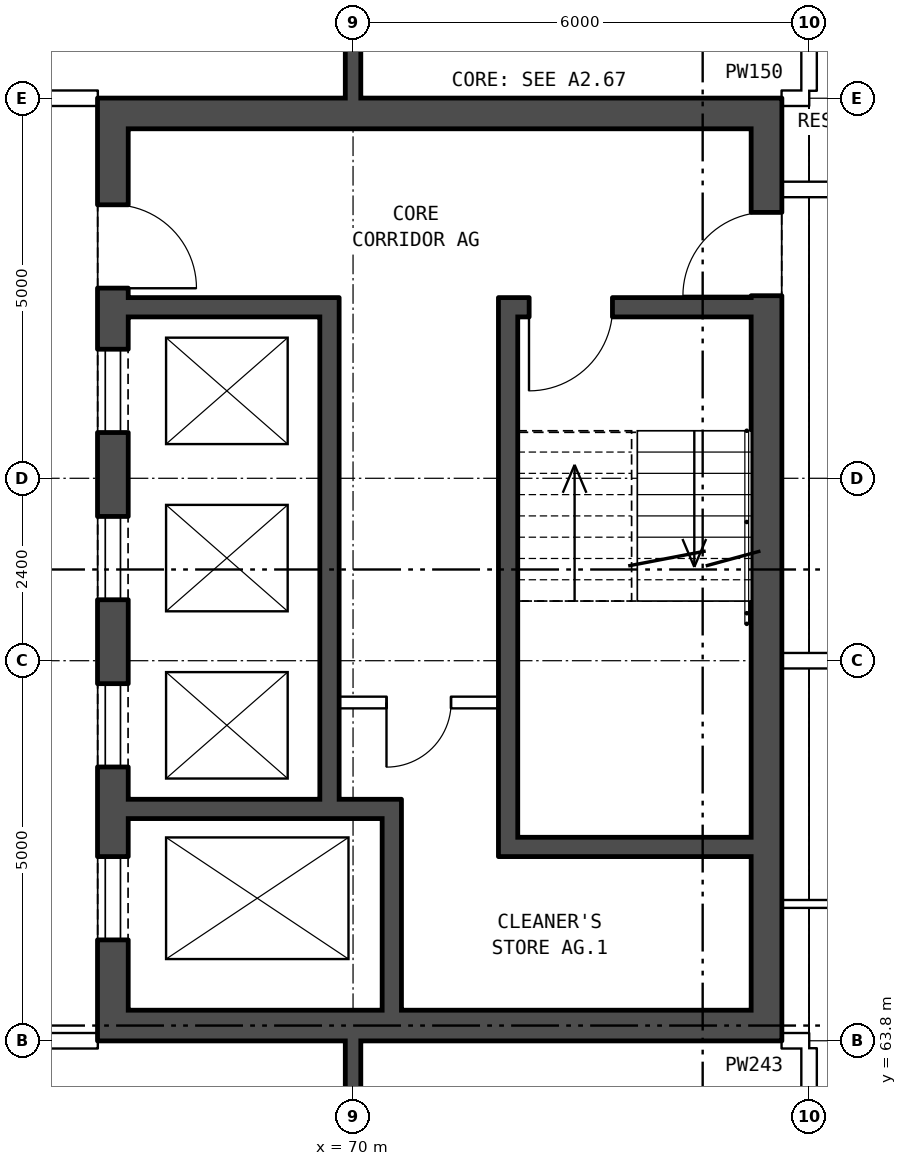
"""IFC4 building model, lengths in metres.
Left out: names, types, materials, properties, quantities, classifications, styles, units other than length and angle.
Written with IfcOpenShell. Run it as: python <this file> out.ifc"""

import sys

from ifc_helpers import new_model, si_unit, direction, frame, frame_2d, origin, place, context, subcontext, project, spatial, rectangle, extrude, element, fill, save


model = new_model("IFC4")
c1 = context("Model", 3, precision=1e-05, world=origin(), true_north=direction((0.0, 1.0)))
c2 = subcontext(c1, "Body", "Model", "MODEL_VIEW")
j1 = project(units=[si_unit("LENGTHUNIT", "METRE"), si_unit("PLANEANGLEUNIT", "RADIAN")], contexts=[c1])
p1 = place(None, origin())
s1 = spatial("IfcSite", under=j1, at=p1, CompositionType="ELEMENT")
p2 = place(p1, origin())
s2 = spatial("IfcBuilding", under=s1, at=p2, CompositionType="ELEMENT")
p3 = place(p2, frame((0.0, 0.0, 233.8)))
s3 = spatial("IfcBuildingStorey", under=s2, at=p3, CompositionType="ELEMENT", Elevation=233.8)
p4 = place(p3, frame((66.84, 63.8, 0.0), z_axis=(0.0, 0.0, 1.0), x_axis=(0.0, 1.0, 0.0)))
e1 = element("IfcWall", 1, at=p4, inside=s3, PredefinedType="SHEAR", context=c2, shape_type="SweptSolid", body=[
    extrude(rectangle(XDim=12.4, YDim=0.4, at=frame_2d((6.2, 0.0))), origin(), (0.0, 0.0, 1.0), 2.85),
])
p5 = place(p4, frame((1.325, 0.0, 0.0)))
e2 = element("IfcOpeningElement", 2, at=p5, cuts=e1, PredefinedType="OPENING", context=c2, shape_type="SweptSolid", body=[
    extrude(rectangle(XDim=1.1, YDim=2.1, at=frame_2d((0.55, 1.05))), frame((0.0, 0.21, 0.0), z_axis=(0.0, -1.0, 0.0), x_axis=(1.0, 0.0, 0.0)), (0.0, 0.0, 1.0), 0.42),
])
p6 = place(p4, frame((3.6, 0.0, 0.0)))
e3 = element("IfcOpeningElement", 3, at=p6, cuts=e1, PredefinedType="OPENING", context=c2, shape_type="SweptSolid", body=[
    extrude(rectangle(XDim=1.1, YDim=2.1, at=frame_2d((0.55, 1.05))), frame((0.0, 0.21, 0.0), z_axis=(0.0, -1.0, 0.0), x_axis=(1.0, 0.0, 0.0)), (0.0, 0.0, 1.0), 0.42),
])
p7 = place(p4, frame((5.8, 0.0, 0.0)))
e4 = element("IfcOpeningElement", 4, at=p7, cuts=e1, PredefinedType="OPENING", context=c2, shape_type="SweptSolid", body=[
    extrude(rectangle(XDim=1.1, YDim=2.1, at=frame_2d((0.55, 1.05))), frame((0.0, 0.21, 0.0), z_axis=(0.0, -1.0, 0.0), x_axis=(1.0, 0.0, 0.0)), (0.0, 0.0, 1.0), 0.42),
])
p8 = place(p4, frame((8.0, 0.0, 0.0)))
e5 = element("IfcOpeningElement", 5, at=p8, cuts=e1, PredefinedType="OPENING", context=c2, shape_type="SweptSolid", body=[
    extrude(rectangle(XDim=1.1, YDim=2.1, at=frame_2d((0.55, 1.05))), frame((0.0, 0.21, 0.0), z_axis=(0.0, -1.0, 0.0), x_axis=(1.0, 0.0, 0.0)), (0.0, 0.0, 1.0), 0.42),
])
p9 = place(p4, frame((9.9, 0.0, 0.0)))
e6 = element("IfcOpeningElement", 6, at=p9, cuts=e1, PredefinedType="OPENING", context=c2, shape_type="SweptSolid", body=[
    extrude(rectangle(XDim=1.1, YDim=2.1, at=frame_2d((0.55, 1.05))), frame((0.0, 0.21, 0.0), z_axis=(0.0, -1.0, 0.0), x_axis=(1.0, 0.0, 0.0)), (0.0, 0.0, 1.0), 0.42),
])
p10 = place(p3, frame((75.44, 63.8, 0.0), z_axis=(0.0, 0.0, 1.0), x_axis=(0.0, 1.0, 0.0)))
e7 = element("IfcWall", 7, at=p10, inside=s3, PredefinedType="SHEAR", context=c2, shape_type="SweptSolid", body=[
    extrude(rectangle(XDim=12.4, YDim=0.4, at=frame_2d((6.2, 0.0))), origin(), (0.0, 0.0, 1.0), 2.85),
])
p11 = place(p10, frame((9.8, 0.0, 0.0)))
e8 = element("IfcOpeningElement", 8, at=p11, cuts=e7, PredefinedType="OPENING", context=c2, shape_type="SweptSolid", body=[
    extrude(rectangle(XDim=1.1, YDim=2.1, at=frame_2d((0.55, 1.05))), frame((0.0, 0.21, 0.0), z_axis=(0.0, -1.0, 0.0), x_axis=(1.0, 0.0, 0.0)), (0.0, 0.0, 1.0), 0.42),
])
for number, where, z_axis, x_axis in (
    (9, (67.04, 64.0, 0.0), (0.0, 0.0, 1.0), (1.0, 0.0, 0.0)),
    (10, (67.04, 76.0, 0.0), (0.0, 0.0, 1.0), (1.0, 0.0, 0.0)),
):
    element("IfcWall", number, at=place(p3, frame(where, z_axis=z_axis, x_axis=x_axis)), inside=s3, PredefinedType="SHEAR", context=c2, shape_type="SweptSolid", body=[
        extrude(rectangle(XDim=8.2, YDim=0.4, at=frame_2d((4.1, 0.0))), origin(), (0.0, 0.0, 1.0), 2.85),
    ])
p12 = place(p3, frame((72.165, 66.35, 0.0), z_axis=(0.0, 0.0, 1.0), x_axis=(1.0, 0.0, 0.0)))
e11 = element("IfcWall", 11, at=p12, inside=s3, PredefinedType="SHEAR", context=c2, shape_type="SweptSolid", body=[
    extrude(rectangle(XDim=3.075, YDim=0.25, at=frame_2d((1.538, 0.0))), origin(), (0.0, 0.0, 1.0), 2.85),
])
p13 = place(p3, frame((67.04, 66.85, 0.0), z_axis=(0.0, 0.0, 1.0), x_axis=(1.0, 0.0, 0.0)))
e12 = element("IfcWall", 12, at=p13, inside=s3, PredefinedType="SHEAR", context=c2, shape_type="SweptSolid", body=[
    extrude(rectangle(XDim=3.595, YDim=0.25, at=frame_2d((1.797, 0.0))), origin(), (0.0, 0.0, 1.0), 2.85),
])
p14 = place(p3, frame((69.815, 68.25, 0.0), z_axis=(0.0, 0.0, 1.0), x_axis=(1.0, 0.0, 0.0)))
e13 = element("IfcWall", 13, at=p14, inside=s3, PredefinedType="PARTITIONING", context=c2, shape_type="SweptSolid", body=[
    extrude(rectangle(XDim=2.1, YDim=0.15, at=frame_2d((1.05, 0.0))), origin(), (0.0, 0.0, 1.0), 2.85),
])
p15 = place(p14, frame((0.625, 0.0, 0.0)))
e14 = element("IfcOpeningElement", 14, at=p15, cuts=e13, PredefinedType="OPENING", context=c2, shape_type="SweptSolid", body=[
    extrude(rectangle(XDim=0.85, YDim=2.1, at=frame_2d((0.425, 1.05))), frame((0.0, 0.085, 0.0), z_axis=(0.0, -1.0, 0.0), x_axis=(1.0, 0.0, 0.0)), (0.0, 0.0, 1.0), 0.17),
])
p16 = place(p3, frame((67.04, 73.45, 0.0), z_axis=(0.0, 0.0, 1.0), x_axis=(1.0, 0.0, 0.0)))
e15 = element("IfcWall", 15, at=p16, inside=s3, PredefinedType="SHEAR", context=c2, shape_type="SweptSolid", body=[
    extrude(rectangle(XDim=2.525, YDim=0.25, at=frame_2d((1.262, 0.0))), origin(), (0.0, 0.0, 1.0), 2.85),
])
p17 = place(p3, frame((72.165, 73.45, 0.0), z_axis=(0.0, 0.0, 1.0), x_axis=(1.0, 0.0, 0.0)))
e16 = element("IfcWall", 16, at=p17, inside=s3, PredefinedType="SHEAR", context=c2, shape_type="SweptSolid", body=[
    extrude(rectangle(XDim=3.075, YDim=0.25, at=frame_2d((1.538, 0.0))), origin(), (0.0, 0.0, 1.0), 2.85),
])
p18 = place(p17, frame((0.15, 0.0, 0.0)))
e17 = element("IfcOpeningElement", 17, at=p18, cuts=e16, PredefinedType="OPENING", context=c2, shape_type="SweptSolid", body=[
    extrude(rectangle(XDim=1.1, YDim=2.1, at=frame_2d((0.55, 1.05))), frame((0.0, 0.135, 0.0), z_axis=(0.0, -1.0, 0.0), x_axis=(1.0, 0.0, 0.0)), (0.0, 0.0, 1.0), 0.27),
])
p19 = place(p3, frame((69.69, 66.975, 0.0), z_axis=(0.0, 0.0, 1.0), x_axis=(0.0, 1.0, 0.0)))
e18 = element("IfcWall", 18, at=p19, inside=s3, PredefinedType="SHEAR", context=c2, shape_type="SweptSolid", body=[
    extrude(rectangle(XDim=6.6, YDim=0.25, at=frame_2d((3.3, 0.0))), origin(), (0.0, 0.0, 1.0), 2.85),
])
p20 = place(p3, frame((70.51, 64.2, 0.0), z_axis=(0.0, 0.0, 1.0), x_axis=(0.0, 1.0, 0.0)))
e19 = element("IfcWall", 19, at=p20, inside=s3, PredefinedType="SHEAR", context=c2, shape_type="SweptSolid", body=[
    extrude(rectangle(XDim=2.525, YDim=0.25, at=frame_2d((1.263, 0.0))), origin(), (0.0, 0.0, 1.0), 2.85),
])
p21 = place(p3, frame((72.04, 66.225, 0.0), z_axis=(0.0, 0.0, 1.0), x_axis=(0.0, 1.0, 0.0)))
e20 = element("IfcWall", 20, at=p21, inside=s3, PredefinedType="SHEAR", context=c2, shape_type="SweptSolid", body=[
    extrude(rectangle(XDim=7.35, YDim=0.25, at=frame_2d((3.675, 0.0))), origin(), (0.0, 0.0, 1.0), 2.85),
])
p22 = place(p3, frame((63.64, 63.8, 0.0), z_axis=(0.0, 0.0, 1.0), x_axis=(1.0, 0.0, 0.0)))
e21 = element("IfcWall", 21, at=p22, inside=s3, PredefinedType="PARTITIONING", context=c2, shape_type="SweptSolid", body=[
    extrude(rectangle(XDim=3.0, YDim=0.2, at=frame_2d((1.5, 0.0))), origin(), (0.0, 0.0, 1.0), 2.85),
])
p23 = place(p22, frame((1.18, 0.0, 0.0)))
e22 = element("IfcOpeningElement", 22, at=p23, cuts=e21, PredefinedType="OPENING", context=c2, shape_type="SweptSolid", body=[
    extrude(rectangle(XDim=1.0, YDim=2.1, at=frame_2d((0.5, 1.05))), frame((0.0, 0.11, 0.0), z_axis=(0.0, -1.0, 0.0), x_axis=(1.0, 0.0, 0.0)), (0.0, 0.0, 1.0), 0.22),
])
p24 = place(p3, frame((75.64, 63.8, 0.0), z_axis=(0.0, 0.0, 1.0), x_axis=(1.0, 0.0, 0.0)))
e23 = element("IfcWall", 23, at=p24, inside=s3, PredefinedType="PARTITIONING", context=c2, shape_type="SweptSolid", body=[
    extrude(rectangle(XDim=0.36, YDim=0.2, at=frame_2d((0.18, 0.0))), origin(), (0.0, 0.0, 1.0), 2.85),
])
p25 = place(p3, frame((75.64, 65.6, 0.0), z_axis=(0.0, 0.0, 1.0), x_axis=(1.0, 0.0, 0.0)))
e24 = element("IfcWall", 24, at=p25, inside=s3, PredefinedType="PARTITIONING", context=c2, shape_type="SweptSolid", body=[
    extrude(rectangle(XDim=3.798, YDim=0.1, at=frame_2d((1.899, 0.0))), origin(), (0.0, 0.0, 1.0), 2.85),
])
p26 = place(p3, frame((75.64, 68.8, 0.0), z_axis=(0.0, 0.0, 1.0), x_axis=(1.0, 0.0, 0.0)))
e25 = element("IfcWall", 25, at=p26, inside=s3, PredefinedType="PARTITIONING", context=c2, shape_type="SweptSolid", body=[
    extrude(rectangle(XDim=55.72, YDim=0.2, at=frame_2d((27.86, 0.0))), origin(), (0.0, 0.0, 1.0), 2.85),
])
p27 = place(p26, frame((5.191, 0.0, 0.0)))
e26 = element("IfcOpeningElement", 26, at=p27, cuts=e25, PredefinedType="OPENING", context=c2, shape_type="SweptSolid", body=[
    extrude(rectangle(XDim=1.0, YDim=2.1, at=frame_2d((0.5, 1.05))), frame((0.0, 0.11, 0.0), z_axis=(0.0, -1.0, 0.0), x_axis=(1.0, 0.0, 0.0)), (0.0, 0.0, 1.0), 0.22),
])
p28 = place(p26, frame((12.241, 0.0, 0.0)))
e27 = element("IfcOpeningElement", 27, at=p28, cuts=e25, PredefinedType="OPENING", context=c2, shape_type="SweptSolid", body=[
    extrude(rectangle(XDim=1.0, YDim=2.1, at=frame_2d((0.5, 1.05))), frame((0.0, 0.11, 0.0), z_axis=(0.0, -1.0, 0.0), x_axis=(1.0, 0.0, 0.0)), (0.0, 0.0, 1.0), 0.22),
])
p29 = place(p26, frame((22.553, 0.0, 0.0)))
e28 = element("IfcOpeningElement", 28, at=p29, cuts=e25, PredefinedType="OPENING", context=c2, shape_type="SweptSolid", body=[
    extrude(rectangle(XDim=1.0, YDim=2.1, at=frame_2d((0.5, 1.05))), frame((0.0, 0.11, 0.0), z_axis=(0.0, -1.0, 0.0), x_axis=(1.0, 0.0, 0.0)), (0.0, 0.0, 1.0), 0.22),
])
p30 = place(p26, frame((32.866, 0.0, 0.0)))
e29 = element("IfcOpeningElement", 29, at=p30, cuts=e25, PredefinedType="OPENING", context=c2, shape_type="SweptSolid", body=[
    extrude(rectangle(XDim=1.0, YDim=2.1, at=frame_2d((0.5, 1.05))), frame((0.0, 0.11, 0.0), z_axis=(0.0, -1.0, 0.0), x_axis=(1.0, 0.0, 0.0)), (0.0, 0.0, 1.0), 0.22),
])
p31 = place(p26, frame((36.303, 0.0, 0.0)))
e30 = element("IfcOpeningElement", 30, at=p31, cuts=e25, PredefinedType="OPENING", context=c2, shape_type="SweptSolid", body=[
    extrude(rectangle(XDim=1.0, YDim=2.1, at=frame_2d((0.5, 1.05))), frame((0.0, 0.11, 0.0), z_axis=(0.0, -1.0, 0.0), x_axis=(1.0, 0.0, 0.0)), (0.0, 0.0, 1.0), 0.22),
])
p32 = place(p26, frame((46.616, 0.0, 0.0)))
e31 = element("IfcOpeningElement", 31, at=p32, cuts=e25, PredefinedType="OPENING", context=c2, shape_type="SweptSolid", body=[
    extrude(rectangle(XDim=1.0, YDim=2.1, at=frame_2d((0.5, 1.05))), frame((0.0, 0.11, 0.0), z_axis=(0.0, -1.0, 0.0), x_axis=(1.0, 0.0, 0.0)), (0.0, 0.0, 1.0), 0.22),
])
p33 = place(p26, frame((53.496, 0.0, 0.0)))
e32 = element("IfcOpeningElement", 32, at=p33, cuts=e25, PredefinedType="OPENING", context=c2, shape_type="SweptSolid", body=[
    extrude(rectangle(XDim=1.0, YDim=2.1, at=frame_2d((0.5, 1.05))), frame((0.0, 0.11, 0.0), z_axis=(0.0, -1.0, 0.0), x_axis=(1.0, 0.0, 0.0)), (0.0, 0.0, 1.0), 0.22),
])
p34 = place(p3, frame((75.64, 75.0, 0.0), z_axis=(0.0, 0.0, 1.0), x_axis=(1.0, 0.0, 0.0)))
e33 = element("IfcWall", 33, at=p34, inside=s3, PredefinedType="PARTITIONING", context=c2, shape_type="SweptSolid", body=[
    extrude(rectangle(XDim=7.585, YDim=0.2, at=frame_2d((3.792, 0.0))), origin(), (0.0, 0.0, 1.0), 2.85),
])
p35 = place(p34, frame((3.343, 0.0, 0.0)))
e34 = element("IfcOpeningElement", 34, at=p35, cuts=e33, PredefinedType="OPENING", context=c2, shape_type="SweptSolid", body=[
    extrude(rectangle(XDim=0.9, YDim=2.1, at=frame_2d((0.45, 1.05))), frame((0.0, 0.11, 0.0), z_axis=(0.0, -1.0, 0.0), x_axis=(1.0, 0.0, 0.0)), (0.0, 0.0, 1.0), 0.22),
])
p36 = place(p3, frame((63.64, 76.2, 0.0), z_axis=(0.0, 0.0, 1.0), x_axis=(1.0, 0.0, 0.0)))
e35 = element("IfcWall", 35, at=p36, inside=s3, PredefinedType="PARTITIONING", context=c2, shape_type="SweptSolid", body=[
    extrude(rectangle(XDim=3.0, YDim=0.2, at=frame_2d((1.5, 0.0))), origin(), (0.0, 0.0, 1.0), 2.85),
])
p37 = place(p36, frame((1.18, 0.0, 0.0)))
e36 = element("IfcOpeningElement", 36, at=p37, cuts=e35, PredefinedType="OPENING", context=c2, shape_type="SweptSolid", body=[
    extrude(rectangle(XDim=1.0, YDim=2.1, at=frame_2d((0.5, 1.05))), frame((0.0, 0.11, 0.0), z_axis=(0.0, -1.0, 0.0), x_axis=(1.0, 0.0, 0.0)), (0.0, 0.0, 1.0), 0.22),
])
p38 = place(p3, frame((75.64, 76.2, 0.0), z_axis=(0.0, 0.0, 1.0), x_axis=(1.0, 0.0, 0.0)))
e37 = element("IfcWall", 37, at=p38, inside=s3, PredefinedType="PARTITIONING", context=c2, shape_type="SweptSolid", body=[
    extrude(rectangle(XDim=0.36, YDim=0.2, at=frame_2d((0.18, 0.0))), origin(), (0.0, 0.0, 1.0), 2.85),
])
p39 = place(p3, frame((70.0, 54.36, 0.0), z_axis=(0.0, 0.0, 1.0), x_axis=(0.0, 1.0, 0.0)))
e38 = element("IfcWall", 38, at=p39, inside=s3, PredefinedType="SOLIDWALL", context=c2, shape_type="SweptSolid", body=[
    extrude(rectangle(XDim=9.44, YDim=0.2, at=frame_2d((4.72, 0.0))), origin(), (0.0, 0.0, 1.0), 2.85),
])
p40 = place(p39, frame((2.32, 0.0, 0.0)))
e39 = element("IfcOpeningElement", 39, at=p40, cuts=e38, PredefinedType="OPENING", context=c2, shape_type="SweptSolid", body=[
    extrude(rectangle(XDim=0.9, YDim=2.1, at=frame_2d((0.45, 1.05))), frame((0.0, 0.11, 0.0), z_axis=(0.0, -1.0, 0.0), x_axis=(1.0, 0.0, 0.0)), (0.0, 0.0, 1.0), 0.22),
])
p41 = place(p39, frame((7.39, 0.0, 0.0)))
e40 = element("IfcOpeningElement", 40, at=p41, cuts=e38, PredefinedType="OPENING", context=c2, shape_type="SweptSolid", body=[
    extrude(rectangle(XDim=0.8, YDim=2.1, at=frame_2d((0.4, 1.05))), frame((0.0, 0.11, 0.0), z_axis=(0.0, -1.0, 0.0), x_axis=(1.0, 0.0, 0.0)), (0.0, 0.0, 1.0), 0.22),
])
p42 = place(p3, frame((70.0, 76.2, 0.0), z_axis=(0.0, 0.0, 1.0), x_axis=(0.0, 1.0, 0.0)))
e41 = element("IfcWall", 41, at=p42, inside=s3, PredefinedType="SOLIDWALL", context=c2, shape_type="SweptSolid", body=[
    extrude(rectangle(XDim=9.44, YDim=0.2, at=frame_2d((4.72, 0.0))), origin(), (0.0, 0.0, 1.0), 2.85),
])
p43 = place(p42, frame((5.92, 0.0, 0.0)))
e42 = element("IfcOpeningElement", 42, at=p43, cuts=e41, PredefinedType="OPENING", context=c2, shape_type="SweptSolid", body=[
    extrude(rectangle(XDim=0.9, YDim=2.1, at=frame_2d((0.45, 1.05))), frame((0.0, 0.11, 0.0), z_axis=(0.0, -1.0, 0.0), x_axis=(1.0, 0.0, 0.0)), (0.0, 0.0, 1.0), 0.22),
])
p44 = place(p42, frame((1.25, 0.0, 0.0)))
e43 = element("IfcOpeningElement", 43, at=p44, cuts=e41, PredefinedType="OPENING", context=c2, shape_type="SweptSolid", body=[
    extrude(rectangle(XDim=0.8, YDim=2.1, at=frame_2d((0.4, 1.05))), frame((0.0, 0.11, 0.0), z_axis=(0.0, -1.0, 0.0), x_axis=(1.0, 0.0, 0.0)), (0.0, 0.0, 1.0), 0.22),
])
for number, where, z_axis, x_axis in (
    (44, (76.0, 54.36, 0.0), (0.0, 0.0, 1.0), (0.0, 1.0, 0.0)),
    (45, (76.0, 76.3, 0.0), (0.0, 0.0, 1.0), (0.0, 1.0, 0.0)),
):
    element("IfcWall", number, at=place(p3, frame(where, z_axis=z_axis, x_axis=x_axis)), inside=s3, PredefinedType="PARTITIONING", context=c2, shape_type="SweptSolid", body=[
        extrude(rectangle(XDim=9.34, YDim=0.2, at=frame_2d((4.67, 0.0))), origin(), (0.0, 0.0, 1.0), 2.85),
    ])
p45 = place(p5, origin())
e46 = element("IfcDoor", 46, at=p45, inside=s3, OperationType="DOUBLE_DOOR_SLIDING", PredefinedType="DOOR", context=c2, shape_type="SweptSolid", body=[
    extrude(rectangle(XDim=1.1, YDim=2.1, at=frame_2d((0.55, 1.05))), frame((0.0, -0.135, 0.0), z_axis=(0.0, -1.0, 0.0), x_axis=(1.0, 0.0, 0.0)), (0.0, 0.0, 1.0), 0.05),
])
fill(e2, e46)
p46 = place(p6, origin())
e47 = element("IfcDoor", 47, at=p46, inside=s3, OperationType="DOUBLE_DOOR_SLIDING", PredefinedType="DOOR", context=c2, shape_type="SweptSolid", body=[
    extrude(rectangle(XDim=1.1, YDim=2.1, at=frame_2d((0.55, 1.05))), frame((0.0, -0.135, 0.0), z_axis=(0.0, -1.0, 0.0), x_axis=(1.0, 0.0, 0.0)), (0.0, 0.0, 1.0), 0.05),
])
fill(e3, e47)
p47 = place(p7, origin())
e48 = element("IfcDoor", 48, at=p47, inside=s3, OperationType="DOUBLE_DOOR_SLIDING", PredefinedType="DOOR", context=c2, shape_type="SweptSolid", body=[
    extrude(rectangle(XDim=1.1, YDim=2.1, at=frame_2d((0.55, 1.05))), frame((0.0, -0.135, 0.0), z_axis=(0.0, -1.0, 0.0), x_axis=(1.0, 0.0, 0.0)), (0.0, 0.0, 1.0), 0.05),
])
fill(e4, e48)
p48 = place(p8, origin())
e49 = element("IfcDoor", 49, at=p48, inside=s3, OperationType="DOUBLE_DOOR_SLIDING", PredefinedType="DOOR", context=c2, shape_type="SweptSolid", body=[
    extrude(rectangle(XDim=1.1, YDim=2.1, at=frame_2d((0.55, 1.05))), frame((0.0, -0.135, 0.0), z_axis=(0.0, -1.0, 0.0), x_axis=(1.0, 0.0, 0.0)), (0.0, 0.0, 1.0), 0.05),
])
fill(e5, e49)
p49 = place(p9, frame((1.1, 0.0, 0.0), z_axis=(0.0, 0.0, 1.0), x_axis=(-1.0, 0.0, 0.0)))
e50 = element("IfcDoor", 50, at=p49, inside=s3, OperationType="SINGLE_SWING_RIGHT", PredefinedType="DOOR", context=c2, shape_type="SweptSolid", body=[
    extrude(rectangle(XDim=1.1, YDim=2.1, at=frame_2d((0.55, 1.05))), frame((0.0, 0.185, 0.0), z_axis=(0.0, -1.0, 0.0), x_axis=(1.0, 0.0, 0.0)), (0.0, 0.0, 1.0), 0.05),
])
fill(e6, e50)
p50 = place(p18, frame((1.1, 0.0, 0.0), z_axis=(0.0, 0.0, 1.0), x_axis=(-1.0, 0.0, 0.0)))
e51 = element("IfcDoor", 51, at=p50, inside=s3, OperationType="SINGLE_SWING_RIGHT", PredefinedType="DOOR", context=c2, shape_type="SweptSolid", body=[
    extrude(rectangle(XDim=1.1, YDim=2.1, at=frame_2d((0.55, 1.05))), frame((0.0, 0.025, 0.0), z_axis=(0.0, -1.0, 0.0), x_axis=(1.0, 0.0, 0.0)), (0.0, 0.0, 1.0), 0.05),
])
fill(e17, e51)
p51 = place(p15, frame((0.85, 0.0, 0.0), z_axis=(0.0, 0.0, 1.0), x_axis=(-1.0, 0.0, 0.0)))
e52 = element("IfcDoor", 52, at=p51, inside=s3, OperationType="SINGLE_SWING_RIGHT", PredefinedType="DOOR", context=c2, shape_type="SweptSolid", body=[
    extrude(rectangle(XDim=0.85, YDim=2.1, at=frame_2d((0.425, 1.05))), frame((0.0, 0.025, 0.0), z_axis=(0.0, -1.0, 0.0), x_axis=(1.0, 0.0, 0.0)), (0.0, 0.0, 1.0), 0.05),
])
fill(e14, e52)
p52 = place(p11, origin())
e53 = element("IfcDoor", 53, at=p52, inside=s3, OperationType="SINGLE_SWING_LEFT", PredefinedType="DOOR", context=c2, shape_type="SweptSolid", body=[
    extrude(rectangle(XDim=1.1, YDim=2.1, at=frame_2d((0.55, 1.05))), frame((0.0, 0.185, 0.0), z_axis=(0.0, -1.0, 0.0), x_axis=(1.0, 0.0, 0.0)), (0.0, 0.0, 1.0), 0.05),
])
fill(e8, e53)
save(model, sys.argv[1])
